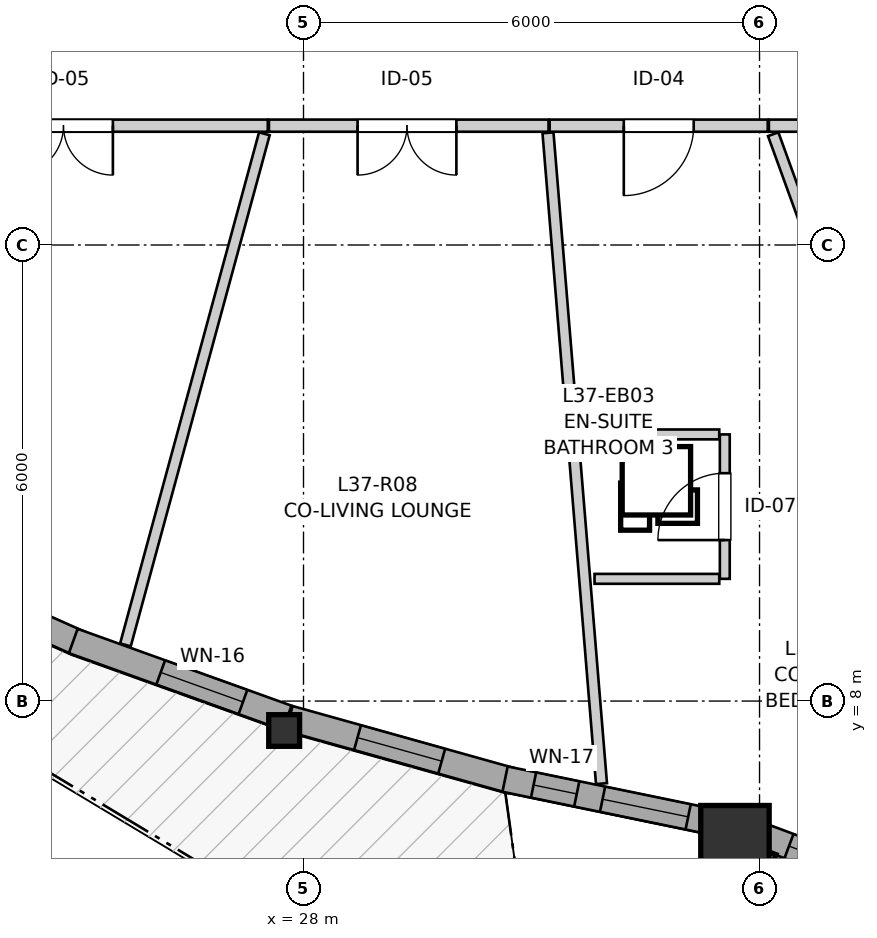
"""IFC4 building model, lengths in metres.
Left out: names, types, materials, properties, quantities, classifications, styles, units other than length and angle.
Written with IfcOpenShell. Run it as: python <this file> out.ifc"""

import sys

from ifc_helpers import new_model, si_unit, direction, frame, frame_2d, origin, origin_2d, place, context, subcontext, project, spatial, rectangle, i_section, extrude, source, transform, mapped, element, fill, save


model = new_model("IFC4")
c1 = context("Model", 3, precision=1e-05, world=origin(), true_north=direction((0.0, 1.0)))
c2 = subcontext(c1, "Body", "Model", "MODEL_VIEW")
j1 = project(units=[si_unit("LENGTHUNIT", "METRE"), si_unit("PLANEANGLEUNIT", "RADIAN")], contexts=[c1])
p1 = place(None, origin())
s1 = spatial("IfcSite", under=j1, at=p1, CompositionType="ELEMENT")
p2 = place(p1, origin())
s2 = spatial("IfcBuilding", under=s1, at=p2, CompositionType="ELEMENT")
p3 = place(p2, frame((0.0, 0.0, 124.8)))
s3 = spatial("IfcBuildingStorey", under=s2, at=p3, CompositionType="ELEMENT", Elevation=124.8)
m1 = source(origin(), c2, "Body", "SweptSolid", [
    extrude(i_section(OverallWidth=0.406, OverallDepth=0.416, WebThickness=0.027, FlangeThickness=0.044, FilletRadius=0.015, at=origin_2d()), origin(), (0.0, 0.0, 1.0), 2.9),
])
p4 = place(p3, frame((27.746, 7.613, 0.0), z_axis=(0.0, 0.0, 1.0), x_axis=(1.0, 0.0, 0.0)))
e1 = element("IfcColumn", 1, at=p4, inside=s3, PredefinedType="PILASTER", context=c2, shape_type="MappedRepresentation", body=[
    mapped(m1, transform((0.0, 0.0, 0.0), x_axis=(1.0, 0.0, 0.0), y_axis=(0.0, 1.0, 0.0), z_axis=(0.0, 0.0, 1.0), scale=1.0)),
])
m2 = source(origin(), c2, "Body", "SweptSolid", [
    extrude(rectangle(XDim=0.9, YDim=0.9, at=origin_2d()), origin(), (0.0, 0.0, 1.0), 2.9),
])
p5 = place(p3, frame((33.677, 6.176, 0.0), z_axis=(0.0, 0.0, 1.0), x_axis=(1.0, 0.0, 0.0)))
e2 = element("IfcColumn", 2, at=p5, inside=s3, PredefinedType="COLUMN", context=c2, shape_type="MappedRepresentation", body=[
    mapped(m2, transform((0.0, 0.0, 0.0), x_axis=(1.0, 0.0, 0.0), y_axis=(0.0, 1.0, 0.0), z_axis=(0.0, 0.0, 1.0), scale=1.0)),
])
p6 = place(p3, frame((22.544, 9.875, 0.0), z_axis=(0.0, 0.0, 1.0), x_axis=(0.913404185574, -0.407053797153, 0.0)))
e3 = element("IfcWall", 3, at=p6, inside=s3, PredefinedType="SOLIDWALL", context=c2, shape_type="SweptSolid", body=[
    extrude(rectangle(XDim=2.746, YDim=0.34, at=frame_2d((1.373, 0.0))), origin(), (0.0, 0.0, 1.0), 2.43),
])
p7 = place(p6, frame((0.493, 0.0, 0.82)))
e4 = element("IfcOpeningElement", 4, at=p7, cuts=e3, PredefinedType="OPENING", context=c2, shape_type="SweptSolid", body=[
    extrude(rectangle(XDim=1.75, YDim=1.3, at=frame_2d((0.875, 0.65))), frame((0.0, 0.18, 0.0), z_axis=(0.0, -1.0, 0.0), x_axis=(1.0, 0.0, 0.0)), (0.0, 0.0, 1.0), 0.36),
])
p8 = place(p3, frame((24.971, 8.79, 0.0), z_axis=(0.0, 0.0, 1.0), x_axis=(0.941086086789, -0.338167084814, 0.0)))
e5 = element("IfcWall", 5, at=p8, inside=s3, PredefinedType="SOLIDWALL", context=c2, shape_type="SweptSolid", body=[
    extrude(rectangle(XDim=2.99, YDim=0.34, at=frame_2d((1.495, 0.0))), origin(), (0.0, 0.0, 1.0), 2.43),
])
p9 = place(p8, frame((1.222, 0.0, 0.82)))
e6 = element("IfcOpeningElement", 6, at=p9, cuts=e5, PredefinedType="OPENING", context=c2, shape_type="SweptSolid", body=[
    extrude(rectangle(XDim=1.15, YDim=1.2, at=frame_2d((0.575, 0.6))), frame((0.0, 0.18, 0.0), z_axis=(0.0, -1.0, 0.0), x_axis=(1.0, 0.0, 0.0)), (0.0, 0.0, 1.0), 0.36),
])
p10 = place(p3, frame((27.811, 7.771, 0.0), z_axis=(0.0, 0.0, 1.0), x_axis=(0.963039905189, -0.269358758934, 0.0)))
e7 = element("IfcWall", 7, at=p10, inside=s3, PredefinedType="SOLIDWALL", context=c2, shape_type="SweptSolid", body=[
    extrude(rectangle(XDim=3.039, YDim=0.34, at=frame_2d((1.52, 0.0))), origin(), (0.0, 0.0, 1.0), 2.43),
])
p11 = place(p10, frame((0.935, 0.0, 0.82)))
e8 = element("IfcOpeningElement", 8, at=p11, cuts=e7, PredefinedType="OPENING", context=c2, shape_type="SweptSolid", body=[
    extrude(rectangle(XDim=1.15, YDim=1.2, at=frame_2d((0.575, 0.6))), frame((0.0, 0.18, 0.0), z_axis=(0.0, -1.0, 0.0), x_axis=(1.0, 0.0, 0.0)), (0.0, 0.0, 1.0), 0.36),
])
p12 = place(p3, frame((30.652, 6.973, 0.0), z_axis=(0.0, 0.0, 1.0), x_axis=(0.979418300652, -0.201841007595, 0.0)))
e9 = element("IfcWall", 9, at=p12, inside=s3, PredefinedType="SOLIDWALL", context=c2, shape_type="SweptSolid", body=[
    extrude(rectangle(XDim=2.893, YDim=0.34, at=frame_2d((1.447, 0.0))), origin(), (0.0, 0.0, 1.0), 2.43),
])
p13 = place(p12, frame((0.383, 0.0, 0.82)))
e10 = element("IfcOpeningElement", 10, at=p13, cuts=e9, PredefinedType="OPENING", context=c2, shape_type="SweptSolid", body=[
    extrude(rectangle(XDim=0.58, YDim=1.35, at=frame_2d((0.29, 0.675))), frame((0.0, 0.18, 0.0), z_axis=(0.0, -1.0, 0.0), x_axis=(1.0, 0.0, 0.0)), (0.0, 0.0, 1.0), 0.36),
])
p14 = place(p12, frame((1.31, 0.0, 0.82)))
e11 = element("IfcOpeningElement", 11, at=p14, cuts=e9, PredefinedType="OPENING", context=c2, shape_type="SweptSolid", body=[
    extrude(rectangle(XDim=1.15, YDim=1.2, at=frame_2d((0.575, 0.6))), frame((0.0, 0.18, 0.0), z_axis=(0.0, -1.0, 0.0), x_axis=(1.0, 0.0, 0.0)), (0.0, 0.0, 1.0), 0.36),
])
p15 = place(p3, frame((33.952, 6.255, 0.0), z_axis=(0.0, 0.0, 1.0), x_axis=(0.936799566991, -0.349866504951, 0.0)))
e12 = element("IfcWall", 12, at=p15, inside=s3, PredefinedType="SOLIDWALL", context=c2, shape_type="SweptSolid", body=[
    extrude(rectangle(XDim=1.831, YDim=0.34, at=frame_2d((0.916, 0.0))), origin(), (0.0, 0.0, 1.0), 2.43),
])
p16 = place(p15, frame((0.466, 0.0, 0.82)))
e13 = element("IfcOpeningElement", 13, at=p16, cuts=e12, PredefinedType="OPENING", context=c2, shape_type="SweptSolid", body=[
    extrude(rectangle(XDim=1.05, YDim=1.45, at=frame_2d((0.525, 0.725))), frame((0.0, 0.18, 0.0), z_axis=(0.0, -1.0, 0.0), x_axis=(1.0, 0.0, 0.0)), (0.0, 0.0, 1.0), 0.36),
])
p17 = place(p3, frame((27.53, 15.57, 0.0), z_axis=(0.0, 0.0, 1.0), x_axis=(-1.0, 0.0, 0.0)))
e14 = element("IfcWall", 14, at=p17, inside=s3, PredefinedType="PARTITIONING", context=c2, shape_type="SweptSolid", body=[
    extrude(rectangle(XDim=5.36, YDim=0.16, at=frame_2d((2.68, 0.0))), origin(), (0.0, 0.0, 1.0), 2.9),
])
p18 = place(p17, frame((2.038, 0.0, 0.0)))
e15 = element("IfcOpeningElement", 15, at=p18, cuts=e14, PredefinedType="OPENING", context=c2, shape_type="SweptSolid", body=[
    extrude(rectangle(XDim=1.3, YDim=2.1, at=frame_2d((0.65, 1.05))), frame((0.0, 0.09, 0.0), z_axis=(0.0, -1.0, 0.0), x_axis=(1.0, 0.0, 0.0)), (0.0, 0.0, 1.0), 0.18),
])
p19 = place(p3, frame((31.224, 15.57, 0.0), z_axis=(0.0, 0.0, 1.0), x_axis=(-1.0, 0.0, 0.0)))
e16 = element("IfcWall", 16, at=p19, inside=s3, PredefinedType="PARTITIONING", context=c2, shape_type="SweptSolid", body=[
    extrude(rectangle(XDim=3.679, YDim=0.16, at=frame_2d((1.84, 0.0))), origin(), (0.0, 0.0, 1.0), 2.9),
])
p20 = place(p19, frame((1.212, 0.0, 0.0)))
e17 = element("IfcOpeningElement", 17, at=p20, cuts=e16, PredefinedType="OPENING", context=c2, shape_type="SweptSolid", body=[
    extrude(rectangle(XDim=1.3, YDim=2.1, at=frame_2d((0.65, 1.05))), frame((0.0, 0.09, 0.0), z_axis=(0.0, -1.0, 0.0), x_axis=(1.0, 0.0, 0.0)), (0.0, 0.0, 1.0), 0.18),
])
p21 = place(p3, frame((37.524, 15.57, 0.0), z_axis=(0.0, 0.0, 1.0), x_axis=(-1.0, 0.0, 0.0)))
e18 = element("IfcWall", 18, at=p21, inside=s3, PredefinedType="PARTITIONING", context=c2, shape_type="SweptSolid", body=[
    extrude(rectangle(XDim=3.401, YDim=0.16, at=frame_2d((1.7, 0.0))), origin(), (0.0, 0.0, 1.0), 2.9),
])
p22 = place(p21, frame((1.241, 0.0, 0.0)))
e19 = element("IfcOpeningElement", 19, at=p22, cuts=e18, PredefinedType="OPENING", context=c2, shape_type="SweptSolid", body=[
    extrude(rectangle(XDim=0.92, YDim=2.1, at=frame_2d((0.46, 1.05))), frame((0.0, 0.09, 0.0), z_axis=(0.0, -1.0, 0.0), x_axis=(1.0, 0.0, 0.0)), (0.0, 0.0, 1.0), 0.18),
])
p23 = place(p3, frame((34.108, 15.57, 0.0), z_axis=(0.0, 0.0, 1.0), x_axis=(-1.0, 0.0, 0.0)))
e20 = element("IfcWall", 20, at=p23, inside=s3, PredefinedType="PARTITIONING", context=c2, shape_type="SweptSolid", body=[
    extrude(rectangle(XDim=2.869, YDim=0.16, at=frame_2d((1.435, 0.0))), origin(), (0.0, 0.0, 1.0), 2.9),
])
p24 = place(p23, frame((0.974, 0.0, 0.0)))
e21 = element("IfcOpeningElement", 21, at=p24, cuts=e20, PredefinedType="OPENING", context=c2, shape_type="SweptSolid", body=[
    extrude(rectangle(XDim=0.92, YDim=2.1, at=frame_2d((0.46, 1.05))), frame((0.0, 0.09, 0.0), z_axis=(0.0, -1.0, 0.0), x_axis=(1.0, 0.0, 0.0)), (0.0, 0.0, 1.0), 0.18),
])
p25 = place(p3, frame((33.543, 9.608, 0.0), z_axis=(0.0, 0.0, 1.0), x_axis=(0.0, 1.0, 0.0)))
e22 = element("IfcWall", 22, at=p25, inside=s3, PredefinedType="PARTITIONING", context=c2, shape_type="SweptSolid", body=[
    extrude(rectangle(XDim=1.9, YDim=0.13, at=frame_2d((0.95, 0.0))), origin(), (0.0, 0.0, 1.0), 2.9),
])
p26 = place(p25, frame((0.51, 0.0, 0.0)))
e23 = element("IfcOpeningElement", 23, at=p26, cuts=e22, PredefinedType="OPENING", context=c2, shape_type="SweptSolid", body=[
    extrude(rectangle(XDim=0.88, YDim=2.05, at=frame_2d((0.44, 1.025))), frame((0.0, 0.075, 0.0), z_axis=(0.0, -1.0, 0.0), x_axis=(1.0, 0.0, 0.0)), (0.0, 0.0, 1.0), 0.15),
])
p27 = place(p3, frame((31.217, 15.476, 0.0), z_axis=(0.0, 0.0, 1.0), x_axis=(0.081928316893, -0.996638224679, 0.0)))
e24 = element("IfcWall", 24, at=p27, inside=s3, PredefinedType="PARTITIONING", context=c2, shape_type="SweptSolid", body=[
    extrude(rectangle(XDim=8.591, YDim=0.145, at=frame_2d((4.295, 0.0))), origin(), (0.0, 0.0, 1.0), 2.9),
])
p28 = place(p3, frame((25.657, 8.739, 0.0), z_axis=(0.0, 0.0, 1.0), x_axis=(0.26231095786, 0.964983399539, 0.0)))
e25 = element("IfcWall", 25, at=p28, inside=s3, PredefinedType="PARTITIONING", context=c2, shape_type="SweptSolid", body=[
    extrude(rectangle(XDim=6.968, YDim=0.145, at=frame_2d((3.484, 0.0))), origin(), (0.0, 0.0, 1.0), 2.9),
])
p29 = place(p3, frame((34.18, 15.458, 0.0), z_axis=(0.0, 0.0, 1.0), x_axis=(0.341373856507, -0.939927598325, 0.0)))
e26 = element("IfcWall", 26, at=p29, inside=s3, PredefinedType="PARTITIONING", context=c2, shape_type="SweptSolid", body=[
    extrude(rectangle(XDim=4.779, YDim=0.145, at=frame_2d((2.389, 0.0))), origin(), (0.0, 0.0, 1.0), 2.9),
])
p30 = place(p3, frame((31.743, 11.508, 0.0), z_axis=(0.0, 0.0, 1.0), x_axis=(1.0, 0.0, 0.0)))
e27 = element("IfcWall", 27, at=p30, inside=s3, PredefinedType="PARTITIONING", context=c2, shape_type="SweptSolid", body=[
    extrude(rectangle(XDim=1.727, YDim=0.13, at=frame_2d((0.864, 0.0))), origin(), (0.0, 0.0, 1.0), 2.9),
])
p31 = place(p3, frame((31.829, 9.608, 0.0), z_axis=(0.0, 0.0, 1.0), x_axis=(1.0, 0.0, 0.0)))
e28 = element("IfcWall", 28, at=p31, inside=s3, PredefinedType="PARTITIONING", context=c2, shape_type="SweptSolid", body=[
    extrude(rectangle(XDim=1.641, YDim=0.13, at=frame_2d((0.82, 0.0))), origin(), (0.0, 0.0, 1.0), 2.508),
])
m3 = source(origin(), c2, "Body", "SweptSolid", [
    extrude(rectangle(XDim=1.15, YDim=1.2, at=frame_2d((0.575, 0.6))), frame((0.0, 0.03, 0.0), z_axis=(0.0, -1.0, 0.0), x_axis=(1.0, 0.0, 0.0)), (0.0, 0.0, 1.0), 0.06),
])
p32 = place(p9, origin())
e29 = element("IfcWindow", 29, at=p32, inside=s3, PartitioningType="SINGLE_PANEL", PredefinedType="WINDOW", context=c2, shape_type="MappedRepresentation", body=[
    mapped(m3, transform((0.0, 0.0, 0.0), x_axis=(1.0, 0.0, 0.0), y_axis=(0.0, 1.0, 0.0), z_axis=(0.0, 0.0, 1.0), scale=1.0)),
])
fill(e6, e29)
p33 = place(p11, origin())
e30 = element("IfcWindow", 30, at=p33, inside=s3, PartitioningType="SINGLE_PANEL", PredefinedType="WINDOW", context=c2, shape_type="MappedRepresentation", body=[
    mapped(m3, transform((0.0, 0.0, 0.0), x_axis=(1.0, 0.0, 0.0), y_axis=(0.0, 1.0, 0.0), z_axis=(0.0, 0.0, 1.0), scale=1.0)),
])
fill(e8, e30)
m4 = source(origin(), c2, "Body", "SweptSolid", [
    extrude(rectangle(XDim=0.58, YDim=1.35, at=frame_2d((0.29, 0.675))), frame((0.0, 0.03, 0.0), z_axis=(0.0, -1.0, 0.0), x_axis=(1.0, 0.0, 0.0)), (0.0, 0.0, 1.0), 0.06),
])
p34 = place(p13, origin())
e31 = element("IfcWindow", 31, at=p34, inside=s3, PartitioningType="SINGLE_PANEL", PredefinedType="WINDOW", context=c2, shape_type="MappedRepresentation", body=[
    mapped(m4, transform((0.0, 0.0, 0.0), x_axis=(1.0, 0.0, 0.0), y_axis=(0.0, 1.0, 0.0), z_axis=(0.0, 0.0, 1.0), scale=1.0)),
])
fill(e10, e31)
p35 = place(p14, origin())
e32 = element("IfcWindow", 32, at=p35, inside=s3, PartitioningType="SINGLE_PANEL", PredefinedType="WINDOW", context=c2, shape_type="MappedRepresentation", body=[
    mapped(m3, transform((0.0, 0.0, 0.0), x_axis=(1.0, 0.0, 0.0), y_axis=(0.0, 1.0, 0.0), z_axis=(0.0, 0.0, 1.0), scale=1.0)),
])
fill(e11, e32)
m5 = source(origin(), c2, "Body", "SweptSolid", [
    extrude(rectangle(XDim=1.05, YDim=1.45, at=frame_2d((0.525, 0.725))), frame((0.0, 0.03, 0.0), z_axis=(0.0, -1.0, 0.0), x_axis=(1.0, 0.0, 0.0)), (0.0, 0.0, 1.0), 0.06),
])
p36 = place(p16, origin())
e33 = element("IfcWindow", 33, at=p36, inside=s3, PartitioningType="SINGLE_PANEL", PredefinedType="WINDOW", context=c2, shape_type="MappedRepresentation", body=[
    mapped(m5, transform((0.0, 0.0, 0.0), x_axis=(1.0, 0.0, 0.0), y_axis=(0.0, 1.0, 0.0), z_axis=(0.0, 0.0, 1.0), scale=1.0)),
])
fill(e13, e33)
m6 = source(origin(), c2, "Body", "SweptSolid", [
    extrude(rectangle(XDim=1.3, YDim=2.1, at=frame_2d((0.65, 1.05))), frame((0.0, 0.025, 0.0), z_axis=(0.0, -1.0, 0.0), x_axis=(1.0, 0.0, 0.0)), (0.0, 0.0, 1.0), 0.05),
])
p37 = place(p18, origin())
e34 = element("IfcDoor", 34, at=p37, inside=s3, OperationType="DOUBLE_DOOR_SINGLE_SWING", PredefinedType="DOOR", context=c2, shape_type="MappedRepresentation", body=[
    mapped(m6, transform((0.0, 0.0, 0.0), x_axis=(1.0, 0.0, 0.0), y_axis=(0.0, 1.0, 0.0), z_axis=(0.0, 0.0, 1.0), scale=1.0)),
])
fill(e15, e34)
p38 = place(p20, origin())
e35 = element("IfcDoor", 35, at=p38, inside=s3, OperationType="DOUBLE_DOOR_SINGLE_SWING", PredefinedType="DOOR", context=c2, shape_type="MappedRepresentation", body=[
    mapped(m6, transform((0.0, 0.0, 0.0), x_axis=(1.0, 0.0, 0.0), y_axis=(0.0, 1.0, 0.0), z_axis=(0.0, 0.0, 1.0), scale=1.0)),
])
fill(e17, e35)
m7 = source(origin(), c2, "Body", "SweptSolid", [
    extrude(rectangle(XDim=0.92, YDim=2.1, at=frame_2d((0.46, 1.05))), frame((0.0, 0.025, 0.0), z_axis=(0.0, -1.0, 0.0), x_axis=(1.0, 0.0, 0.0)), (0.0, 0.0, 1.0), 0.05),
])
p39 = place(p24, origin())
e36 = element("IfcDoor", 36, at=p39, inside=s3, OperationType="SINGLE_SWING_RIGHT", PredefinedType="DOOR", context=c2, shape_type="MappedRepresentation", body=[
    mapped(m7, transform((0.0, 0.0, 0.0), x_axis=(1.0, 0.0, 0.0), y_axis=(0.0, 1.0, 0.0), z_axis=(0.0, 0.0, 1.0), scale=1.0)),
])
fill(e21, e36)
m8 = source(origin(), c2, "Body", "SweptSolid", [
    extrude(rectangle(XDim=0.88, YDim=2.05, at=frame_2d((0.44, 1.025))), frame((0.0, 0.025, 0.0), z_axis=(0.0, -1.0, 0.0), x_axis=(1.0, 0.0, 0.0)), (0.0, 0.0, 1.0), 0.05),
])
p40 = place(p26, origin())
e37 = element("IfcDoor", 37, at=p40, inside=s3, OperationType="SINGLE_SWING_LEFT", PredefinedType="DOOR", context=c2, shape_type="MappedRepresentation", body=[
    mapped(m8, transform((0.0, 0.0, 0.0), x_axis=(1.0, 0.0, 0.0), y_axis=(0.0, 1.0, 0.0), z_axis=(0.0, 0.0, 1.0), scale=1.0)),
])
fill(e23, e37)
save(model, sys.argv[1])
